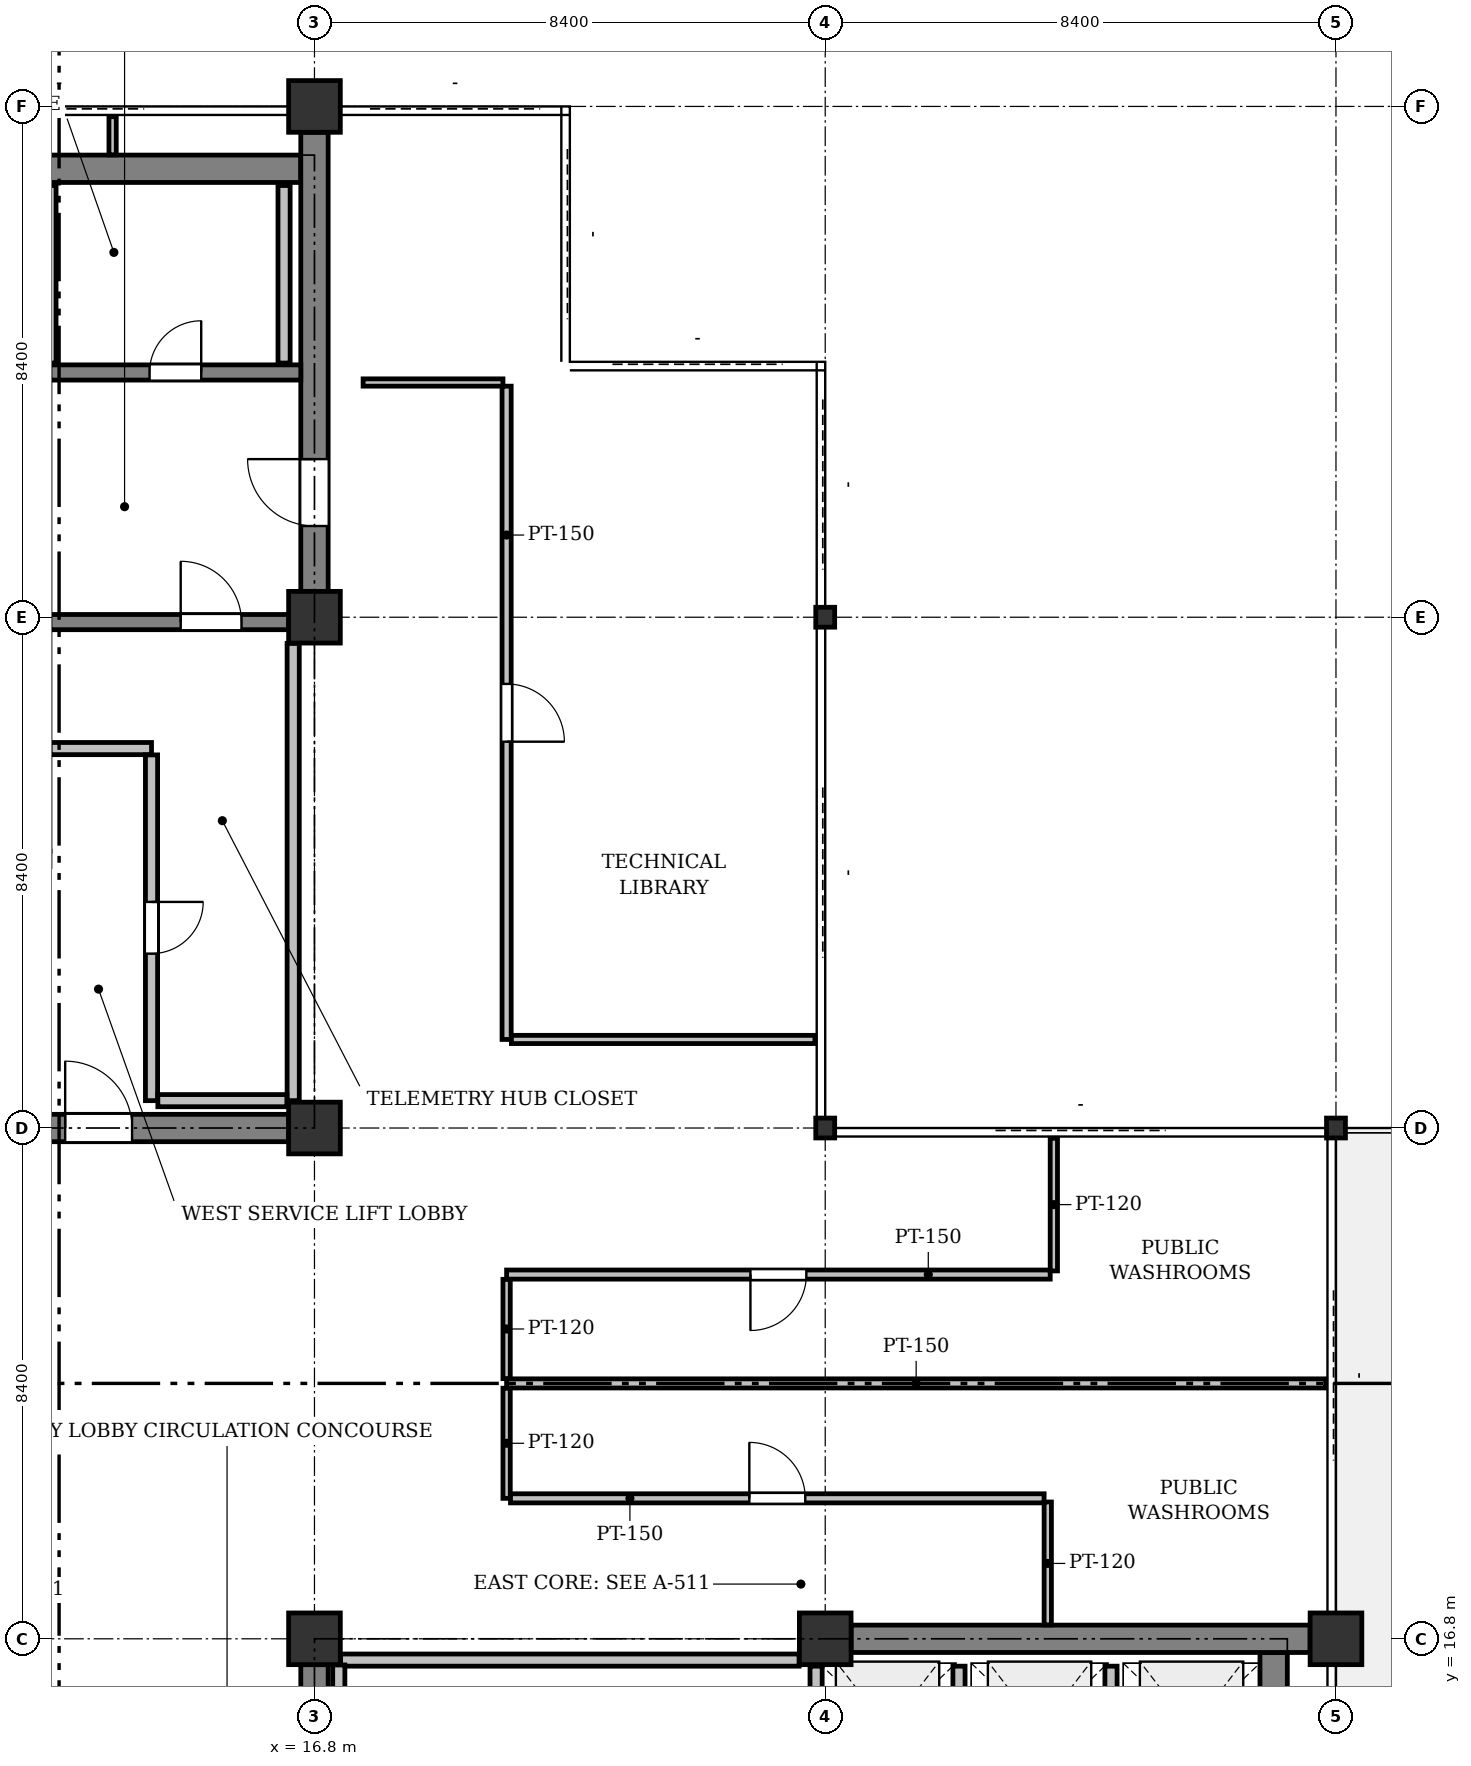
"""IFC4 building model, lengths in metres.
Left out: names, types, materials, properties, quantities, classifications, styles, units other than length and angle.
Written with IfcOpenShell. Run it as: python <this file> out.ifc"""

import sys

from ifc_helpers import new_model, si_unit, direction, frame, frame_2d, origin, origin_2d, place, context, subcontext, project, spatial, rectangle, i_section, extrude, element, fill, save


model = new_model("IFC4")
c1 = context("Model", 3, precision=1e-05, world=origin(), true_north=direction((0.0, 1.0)))
c2 = subcontext(c1, "Body", "Model", "MODEL_VIEW")
j1 = project(units=[si_unit("LENGTHUNIT", "METRE"), si_unit("PLANEANGLEUNIT", "RADIAN")], contexts=[c1])
p1 = place(None, origin())
s1 = spatial("IfcSite", under=j1, at=p1, CompositionType="ELEMENT")
p2 = place(p1, origin())
s2 = spatial("IfcBuilding", under=s1, at=p2, CompositionType="ELEMENT")
p3 = place(p2, frame((0.0, 0.0, 286.2)))
s3 = spatial("IfcBuildingStorey", under=s2, at=p3, CompositionType="ELEMENT", Elevation=286.2)
for number, where, z_axis, x_axis in (
    (1, (16.8, 16.8, 0.0), (0.0, 0.0, 1.0), (1.0, 0.0, 0.0)),
    (2, (16.8, 25.2, 0.0), (0.0, 0.0, 1.0), (1.0, 0.0, 0.0)),
    (3, (16.8, 33.6, 0.0), (0.0, 0.0, 1.0), (1.0, 0.0, 0.0)),
    (4, (16.8, 42.0, 0.0), (0.0, 0.0, 1.0), (1.0, 0.0, 0.0)),
    (5, (25.2, 16.8, 0.0), (0.0, 0.0, 1.0), (1.0, 0.0, 0.0)),
):
    element("IfcColumn", number, at=place(p3, frame(where, z_axis=z_axis, x_axis=x_axis)), inside=s3, PredefinedType="COLUMN", context=c2, shape_type="SweptSolid", body=[
        extrude(rectangle(XDim=0.85, YDim=0.85, at=origin_2d()), origin(), (0.0, 0.0, 1.0), 4.0),
    ])
for number, where, z_axis, x_axis in (
    (6, (25.2, 25.2, 0.0), (0.0, 0.0, 1.0), (1.0, 0.0, 0.0)),
    (7, (25.2, 33.6, 0.0), (0.0, 0.0, 1.0), (1.0, 0.0, 0.0)),
):
    element("IfcColumn", number, at=place(p3, frame(where, z_axis=z_axis, x_axis=x_axis)), inside=s3, PredefinedType="COLUMN", context=c2, shape_type="SweptSolid", body=[
        extrude(i_section(OverallWidth=0.311, OverallDepth=0.327, WebThickness=0.016, FlangeThickness=0.025, FilletRadius=0.017, at=origin_2d()), origin(), (0.0, 0.0, 1.0), 4.0),
    ])
p4 = place(p3, frame((33.6, 16.8, 0.0), z_axis=(0.0, 0.0, 1.0), x_axis=(1.0, 0.0, 0.0)))
e8 = element("IfcColumn", 8, at=p4, inside=s3, PredefinedType="COLUMN", context=c2, shape_type="SweptSolid", body=[
    extrude(rectangle(XDim=0.85, YDim=0.85, at=origin_2d()), origin(), (0.0, 0.0, 1.0), 4.0),
])
p5 = place(p3, frame((33.6, 25.2, 0.0), z_axis=(0.0, 0.0, 1.0), x_axis=(1.0, 0.0, 0.0)))
e9 = element("IfcColumn", 9, at=p5, inside=s3, PredefinedType="COLUMN", context=c2, shape_type="SweptSolid", body=[
    extrude(i_section(OverallWidth=0.311, OverallDepth=0.327, WebThickness=0.016, FlangeThickness=0.025, FilletRadius=0.017, at=origin_2d()), origin(), (0.0, 0.0, 1.0), 4.0),
])
p6 = place(p3, frame((8.625, 40.975, 0.0), z_axis=(0.0, 0.0, 1.0), x_axis=(1.0, 0.0, 0.0)))
e10 = element("IfcWall", 10, at=p6, inside=s3, PredefinedType="SHEAR", context=c2, shape_type="SweptSolid", body=[
    extrude(rectangle(XDim=7.95, YDim=0.45, at=frame_2d((3.975, 0.0))), origin(), (0.0, 0.0, 1.0), 3.725),
])
p7 = place(p3, frame((16.8, 34.025, 0.0), z_axis=(0.0, 0.0, 1.0), x_axis=(0.0, 1.0, 0.0)))
e11 = element("IfcWall", 11, at=p7, inside=s3, PredefinedType="SHEAR", context=c2, shape_type="SweptSolid", body=[
    extrude(rectangle(XDim=7.55, YDim=0.45, at=frame_2d((3.775, 0.0))), origin(), (0.0, 0.0, 1.0), 3.725),
])
p8 = place(p7, frame((1.075, 0.0, 0.0)))
e12 = element("IfcOpeningElement", 12, at=p8, cuts=e11, PredefinedType="OPENING", context=c2, shape_type="SweptSolid", body=[
    extrude(rectangle(XDim=1.1, YDim=2.15, at=frame_2d((0.55, 1.075))), frame((0.0, 0.235, 0.0), z_axis=(0.0, -1.0, 0.0), x_axis=(1.0, 0.0, 0.0)), (0.0, 0.0, 1.0), 0.47),
])
p9 = place(p3, frame((8.825, 25.2, 0.0), z_axis=(0.0, 0.0, 1.0), x_axis=(1.0, 0.0, 0.0)))
e13 = element("IfcWall", 13, at=p9, inside=s3, PredefinedType="SHEAR", context=c2, shape_type="SweptSolid", body=[
    extrude(rectangle(XDim=7.55, YDim=0.45, at=frame_2d((3.775, 0.0))), origin(), (0.0, 0.0, 1.0), 3.725),
])
p10 = place(p9, frame((3.875, 0.0, 0.0)))
e14 = element("IfcOpeningElement", 14, at=p10, cuts=e13, PredefinedType="OPENING", context=c2, shape_type="SweptSolid", body=[
    extrude(rectangle(XDim=1.1, YDim=2.15, at=frame_2d((0.55, 1.075))), frame((0.0, 0.235, 0.0), z_axis=(0.0, -1.0, 0.0), x_axis=(1.0, 0.0, 0.0)), (0.0, 0.0, 1.0), 0.47),
])
p11 = place(p3, frame((32.575, 8.625, 0.0), z_axis=(0.0, 0.0, 1.0), x_axis=(0.0, 1.0, 0.0)))
e15 = element("IfcWall", 15, at=p11, inside=s3, PredefinedType="SHEAR", context=c2, shape_type="SweptSolid", body=[
    extrude(rectangle(XDim=7.95, YDim=0.45, at=frame_2d((3.975, 0.0))), origin(), (0.0, 0.0, 1.0), 3.725),
])
p12 = place(p3, frame((16.8, 8.825, 0.0), z_axis=(0.0, 0.0, 1.0), x_axis=(0.0, 1.0, 0.0)))
e16 = element("IfcWall", 16, at=p12, inside=s3, PredefinedType="SHEAR", context=c2, shape_type="SweptSolid", body=[
    extrude(rectangle(XDim=7.55, YDim=0.45, at=frame_2d((3.775, 0.0))), origin(), (0.0, 0.0, 1.0), 3.725),
])
p13 = place(p12, frame((3.425, 0.0, 0.0)))
e17 = element("IfcOpeningElement", 17, at=p13, cuts=e16, PredefinedType="OPENING", context=c2, shape_type="SweptSolid", body=[
    extrude(rectangle(XDim=1.1, YDim=2.15, at=frame_2d((0.55, 1.075))), frame((0.0, 0.235, 0.0), z_axis=(0.0, -1.0, 0.0), x_axis=(1.0, 0.0, 0.0)), (0.0, 0.0, 1.0), 0.47),
])
p14 = place(p3, frame((25.625, 16.8, 0.0), z_axis=(0.0, 0.0, 1.0), x_axis=(1.0, 0.0, 0.0)))
e18 = element("IfcWall", 18, at=p14, inside=s3, PredefinedType="SHEAR", context=c2, shape_type="SweptSolid", body=[
    extrude(rectangle(XDim=7.55, YDim=0.45, at=frame_2d((3.775, 0.0))), origin(), (0.0, 0.0, 1.0), 3.725),
])
p15 = place(p3, frame((12.45, 33.52, 0.0), z_axis=(0.0, 0.0, 1.0), x_axis=(1.0, 0.0, 0.0)))
e19 = element("IfcWall", 19, at=p15, inside=s3, PredefinedType="SHEAR", context=c2, shape_type="SweptSolid", body=[
    extrude(rectangle(XDim=3.925, YDim=0.25, at=frame_2d((1.962, 0.0))), origin(), (0.0, 0.0, 1.0), 3.725),
])
p16 = place(p15, frame((2.15, 0.0, 0.0)))
e20 = element("IfcOpeningElement", 20, at=p16, cuts=e19, PredefinedType="OPENING", context=c2, shape_type="SweptSolid", body=[
    extrude(rectangle(XDim=1.0, YDim=2.15, at=frame_2d((0.5, 1.075))), frame((0.0, 0.135, 0.0), z_axis=(0.0, -1.0, 0.0), x_axis=(1.0, 0.0, 0.0)), (0.0, 0.0, 1.0), 0.27),
])
p17 = place(p3, frame((12.45, 37.625, 0.0), z_axis=(0.0, 0.0, 1.0), x_axis=(1.0, 0.0, 0.0)))
e21 = element("IfcWall", 21, at=p17, inside=s3, PredefinedType="SHEAR", context=c2, shape_type="SweptSolid", body=[
    extrude(rectangle(XDim=4.125, YDim=0.25, at=frame_2d((2.062, 0.0))), origin(), (0.0, 0.0, 1.0), 3.725),
])
p18 = place(p17, frame((1.637, 0.0, 0.0)))
e22 = element("IfcOpeningElement", 22, at=p18, cuts=e21, PredefinedType="OPENING", context=c2, shape_type="SweptSolid", body=[
    extrude(rectangle(XDim=0.85, YDim=2.15, at=frame_2d((0.425, 1.075))), frame((0.0, 0.135, 0.0), z_axis=(0.0, -1.0, 0.0), x_axis=(1.0, 0.0, 0.0)), (0.0, 0.0, 1.0), 0.27),
])
for number, where, z_axis, x_axis in (
    (23, (27.4, 14.3, 0.0), (0.0, 0.0, 1.0), (0.0, 1.0, 0.0)),
    (24, (25.05, 14.3, 0.0), (0.0, 0.0, 1.0), (0.0, 1.0, 0.0)),
    (25, (29.9, 14.3, 0.0), (0.0, 0.0, 1.0), (0.0, 1.0, 0.0)),
):
    element("IfcWall", number, at=place(p3, frame(where, z_axis=z_axis, x_axis=x_axis)), inside=s3, PredefinedType="PARTITIONING", context=c2, shape_type="SweptSolid", body=[
        extrude(rectangle(XDim=2.05, YDim=0.2, at=frame_2d((1.025, 0.0))), origin(), (0.0, 0.0, 1.0), 3.725),
    ])
p19 = place(p3, frame((16.45, 25.65, 0.0), z_axis=(0.0, 0.0, 1.0), x_axis=(0.0, 1.0, 0.0)))
e26 = element("IfcWall", 26, at=p19, inside=s3, PredefinedType="PARTITIONING", context=c2, shape_type="SweptSolid", body=[
    extrude(rectangle(XDim=7.52, YDim=0.2, at=frame_2d((3.76, 0.0))), origin(), (0.0, 0.0, 1.0), 3.725),
])
p20 = place(p3, frame((12.454, 31.44, 0.0), z_axis=(0.0, 0.0, 1.0), x_axis=(1.0, 0.0, 0.0)))
e27 = element("IfcWall", 27, at=p20, inside=s3, PredefinedType="PARTITIONING", context=c2, shape_type="SweptSolid", body=[
    extrude(rectangle(XDim=1.666, YDim=0.2, at=frame_2d((0.833, 0.0))), origin(), (0.0, 0.0, 1.0), 3.725),
])
p21 = place(p3, frame((14.12, 31.336, 0.0), z_axis=(0.0, 0.0, 1.0), x_axis=(0.0, -1.0, 0.0)))
e28 = element("IfcWall", 28, at=p21, inside=s3, PredefinedType="PARTITIONING", context=c2, shape_type="SweptSolid", body=[
    extrude(rectangle(XDim=5.686, YDim=0.2, at=frame_2d((2.843, 0.0))), origin(), (0.0, 0.0, 1.0), 3.725),
])
p22 = place(p21, frame((2.418, 0.0, 0.0)))
e29 = element("IfcOpeningElement", 29, at=p22, cuts=e28, PredefinedType="OPENING", context=c2, shape_type="SweptSolid", body=[
    extrude(rectangle(XDim=0.85, YDim=2.15, at=frame_2d((0.425, 1.075))), frame((0.0, 0.11, 0.0), z_axis=(0.0, -1.0, 0.0), x_axis=(1.0, 0.0, 0.0)), (0.0, 0.0, 1.0), 0.22),
])
p23 = place(p3, frame((14.224, 25.65, 0.0), z_axis=(0.0, 0.0, 1.0), x_axis=(1.0, 0.0, 0.0)))
e30 = element("IfcWall", 30, at=p23, inside=s3, PredefinedType="PARTITIONING", context=c2, shape_type="SweptSolid", body=[
    extrude(rectangle(XDim=2.122, YDim=0.2, at=frame_2d((1.061, 0.0))), origin(), (0.0, 0.0, 1.0), 3.725),
])
for number, where, z_axis, x_axis in (
    (31, (16.3, 37.78, 0.0), (0.0, 0.0, 1.0), (0.0, 1.0, 0.0)),
    (32, (12.45, 40.7, 0.0), (0.0, 0.0, 1.0), (0.0, -1.0, 0.0)),
):
    element("IfcWall", number, at=place(p3, frame(where, z_axis=z_axis, x_axis=x_axis)), inside=s3, PredefinedType="PARTITIONING", context=c2, shape_type="SweptSolid", body=[
        extrude(rectangle(XDim=2.92, YDim=0.2, at=frame_2d((1.46, 0.0))), origin(), (0.0, 0.0, 1.0), 2.775),
    ])
p24 = place(p3, frame((24.77, 16.45, 0.0), z_axis=(0.0, 0.0, 1.0), x_axis=(-1.0, 0.0, 0.0)))
e33 = element("IfcWall", 33, at=p24, inside=s3, PredefinedType="PARTITIONING", context=c2, shape_type="SweptSolid", body=[
    extrude(rectangle(XDim=7.54, YDim=0.2, at=frame_2d((3.77, 0.0))), origin(), (0.0, 0.0, 1.0), 3.725),
])
p25 = place(p3, frame((17.2, 16.37, 0.0), z_axis=(0.0, 0.0, 1.0), x_axis=(0.0, -1.0, 0.0)))
e34 = element("IfcWall", 34, at=p25, inside=s3, PredefinedType="PARTITIONING", context=c2, shape_type="SweptSolid", body=[
    extrude(rectangle(XDim=2.17, YDim=0.2, at=frame_2d((1.085, 0.0))), origin(), (0.0, 0.0, 1.0), 3.725),
])
p26 = place(p3, frame((33.431, 21.0, 0.0), z_axis=(0.0, 0.0, 1.0), x_axis=(-1.0, 0.0, 0.0)))
e35 = element("IfcWall", 35, at=p26, inside=s3, PredefinedType="PARTITIONING", context=c2, shape_type="SweptSolid", body=[
    extrude(rectangle(XDim=13.471, YDim=0.15, at=frame_2d((6.735, 0.0))), origin(), (0.0, 0.0, 1.0), 3.319),
])
p27 = place(p3, frame((19.96, 20.921, 0.0), z_axis=(0.0, 0.0, 1.0), x_axis=(0.0, -1.0, 0.0)))
e36 = element("IfcWall", 36, at=p27, inside=s3, PredefinedType="PARTITIONING", context=c2, shape_type="SweptSolid", body=[
    extrude(rectangle(XDim=1.811, YDim=0.12, at=frame_2d((0.905, 0.0))), origin(), (0.0, 0.0, 1.0), 3.725),
])
p28 = place(p3, frame((20.024, 19.11, 0.0), z_axis=(0.0, 0.0, 1.0), x_axis=(1.0, 0.0, 0.0)))
e37 = element("IfcWall", 37, at=p28, inside=s3, PredefinedType="PARTITIONING", context=c2, shape_type="SweptSolid", body=[
    extrude(rectangle(XDim=8.776, YDim=0.15, at=frame_2d((4.388, 0.0))), origin(), (0.0, 0.0, 1.0), 3.319),
])
p29 = place(p28, frame((3.928, 0.0, 0.0)))
e38 = element("IfcOpeningElement", 38, at=p29, cuts=e37, PredefinedType="OPENING", context=c2, shape_type="SweptSolid", body=[
    extrude(rectangle(XDim=0.92, YDim=2.1, at=frame_2d((0.46, 1.05))), frame((0.0, 0.085, 0.0), z_axis=(0.0, -1.0, 0.0), x_axis=(1.0, 0.0, 0.0)), (0.0, 0.0, 1.0), 0.17),
])
p30 = place(p3, frame((28.86, 19.05, 0.0), z_axis=(0.0, 0.0, 1.0), x_axis=(0.0, -1.0, 0.0)))
e39 = element("IfcWall", 39, at=p30, inside=s3, PredefinedType="PARTITIONING", context=c2, shape_type="SweptSolid", body=[
    extrude(rectangle(XDim=2.021, YDim=0.12, at=frame_2d((1.01, 0.0))), origin(), (0.0, 0.0, 1.0), 3.725),
])
p31 = place(p3, frame((28.9, 22.79, 0.0), z_axis=(0.0, 0.0, 1.0), x_axis=(-1.0, 0.0, 0.0)))
e40 = element("IfcWall", 40, at=p31, inside=s3, PredefinedType="PARTITIONING", context=c2, shape_type="SweptSolid", body=[
    extrude(rectangle(XDim=8.94, YDim=0.15, at=frame_2d((4.47, 0.0))), origin(), (0.0, 0.0, 1.0), 3.319),
])
p32 = place(p31, frame((4.01, 0.0, 0.0)))
e41 = element("IfcOpeningElement", 41, at=p32, cuts=e40, PredefinedType="OPENING", context=c2, shape_type="SweptSolid", body=[
    extrude(rectangle(XDim=0.92, YDim=2.1, at=frame_2d((0.46, 1.05))), frame((0.0, 0.085, 0.0), z_axis=(0.0, -1.0, 0.0), x_axis=(1.0, 0.0, 0.0)), (0.0, 0.0, 1.0), 0.17),
])
p33 = place(p3, frame((19.96, 22.711, 0.0), z_axis=(0.0, 0.0, 1.0), x_axis=(0.0, -1.0, 0.0)))
e42 = element("IfcWall", 42, at=p33, inside=s3, PredefinedType="PARTITIONING", context=c2, shape_type="SweptSolid", body=[
    extrude(rectangle(XDim=1.632, YDim=0.12, at=frame_2d((0.816, 0.0))), origin(), (0.0, 0.0, 1.0), 3.725),
])
p34 = place(p3, frame((28.96, 25.031, 0.0), z_axis=(0.0, 0.0, 1.0), x_axis=(0.0, -1.0, 0.0)))
e43 = element("IfcWall", 43, at=p34, inside=s3, PredefinedType="PARTITIONING", context=c2, shape_type="SweptSolid", body=[
    extrude(rectangle(XDim=2.181, YDim=0.12, at=frame_2d((1.09, 0.0))), origin(), (0.0, 0.0, 1.0), 3.725),
])
p35 = place(p3, frame((19.96, 37.4, 0.0), z_axis=(0.0, 0.0, 1.0), x_axis=(0.0, -1.0, 0.0)))
e44 = element("IfcWall", 44, at=p35, inside=s3, PredefinedType="PARTITIONING", context=c2, shape_type="SweptSolid", body=[
    extrude(rectangle(XDim=10.743, YDim=0.15, at=frame_2d((5.372, 0.0))), origin(), (0.0, 0.0, 1.0), 3.271),
])
p36 = place(p35, frame((4.897, 0.0, 0.0)))
e45 = element("IfcOpeningElement", 45, at=p36, cuts=e44, PredefinedType="OPENING", context=c2, shape_type="SweptSolid", body=[
    extrude(rectangle(XDim=0.95, YDim=2.15, at=frame_2d((0.475, 1.075))), frame((0.0, 0.085, 0.0), z_axis=(0.0, -1.0, 0.0), x_axis=(1.0, 0.0, 0.0)), (0.0, 0.0, 1.0), 0.17),
])
p37 = place(p3, frame((20.039, 26.656, 0.0), z_axis=(0.0, 0.0, 1.0), x_axis=(1.0, 0.0, 0.0)))
e46 = element("IfcWall", 46, at=p37, inside=s3, PredefinedType="PARTITIONING", context=c2, shape_type="SweptSolid", body=[
    extrude(rectangle(XDim=4.992, YDim=0.135, at=frame_2d((2.496, 0.0))), origin(), (0.0, 0.0, 1.0), 3.421),
])
p38 = place(p3, frame((13.48, 41.831, 0.0), z_axis=(0.0, 0.0, 1.0), x_axis=(0.0, -1.0, 0.0)))
e47 = element("IfcWall", 47, at=p38, inside=s3, PredefinedType="PARTITIONING", context=c2, shape_type="SweptSolid", body=[
    extrude(rectangle(XDim=0.627, YDim=0.12, at=frame_2d((0.313, 0.0))), origin(), (0.0, 0.0, 1.0), 3.725),
])
p39 = place(p3, frame((17.6, 37.46, 0.0), z_axis=(0.0, 0.0, 1.0), x_axis=(1.0, 0.0, 0.0)))
e48 = element("IfcWall", 48, at=p39, inside=s3, PredefinedType="PARTITIONING", context=c2, shape_type="SweptSolid", body=[
    extrude(rectangle(XDim=2.3, YDim=0.12, at=frame_2d((1.15, 0.0))), origin(), (0.0, 0.0, 1.0), 3.725),
])
p40 = place(p8, origin())
e49 = element("IfcDoor", 49, at=p40, inside=s3, OperationType="SINGLE_SWING_RIGHT", PredefinedType="DOOR", context=c2, shape_type="SweptSolid", body=[
    extrude(rectangle(XDim=1.1, YDim=2.15, at=frame_2d((0.55, 1.075))), frame((0.0, 0.025, 0.0), z_axis=(0.0, -1.0, 0.0), x_axis=(1.0, 0.0, 0.0)), (0.0, 0.0, 1.0), 0.05),
])
fill(e12, e49)
p41 = place(p10, origin())
e50 = element("IfcDoor", 50, at=p41, inside=s3, OperationType="SINGLE_SWING_LEFT", PredefinedType="DOOR", context=c2, shape_type="SweptSolid", body=[
    extrude(rectangle(XDim=1.1, YDim=2.15, at=frame_2d((0.55, 1.075))), frame((0.0, 0.025, 0.0), z_axis=(0.0, -1.0, 0.0), x_axis=(1.0, 0.0, 0.0)), (0.0, 0.0, 1.0), 0.05),
])
fill(e14, e50)
p42 = place(p16, origin())
e51 = element("IfcDoor", 51, at=p42, inside=s3, OperationType="SINGLE_SWING_LEFT", PredefinedType="DOOR", context=c2, shape_type="SweptSolid", body=[
    extrude(rectangle(XDim=1.0, YDim=2.15, at=frame_2d((0.5, 1.075))), frame((0.0, 0.025, 0.0), z_axis=(0.0, -1.0, 0.0), x_axis=(1.0, 0.0, 0.0)), (0.0, 0.0, 1.0), 0.05),
])
fill(e20, e51)
p43 = place(p22, origin())
e52 = element("IfcDoor", 52, at=p43, inside=s3, OperationType="SINGLE_SWING_LEFT", PredefinedType="DOOR", context=c2, shape_type="SweptSolid", body=[
    extrude(rectangle(XDim=0.85, YDim=2.15, at=frame_2d((0.425, 1.075))), frame((0.0, 0.025, 0.0), z_axis=(0.0, -1.0, 0.0), x_axis=(1.0, 0.0, 0.0)), (0.0, 0.0, 1.0), 0.05),
])
fill(e29, e52)
p44 = place(p18, origin())
e53 = element("IfcDoor", 53, at=p44, inside=s3, OperationType="SINGLE_SWING_RIGHT", PredefinedType="DOOR", context=c2, shape_type="SweptSolid", body=[
    extrude(rectangle(XDim=0.85, YDim=2.15, at=frame_2d((0.425, 1.075))), frame((0.0, 0.025, 0.0), z_axis=(0.0, -1.0, 0.0), x_axis=(1.0, 0.0, 0.0)), (0.0, 0.0, 1.0), 0.05),
])
fill(e22, e53)
p45 = place(p29, origin())
e54 = element("IfcDoor", 54, at=p45, inside=s3, OperationType="SINGLE_SWING_LEFT", PredefinedType="DOOR", context=c2, shape_type="SweptSolid", body=[
    extrude(rectangle(XDim=0.92, YDim=2.1, at=frame_2d((0.46, 1.05))), frame((0.0, 0.025, 0.0), z_axis=(0.0, -1.0, 0.0), x_axis=(1.0, 0.0, 0.0)), (0.0, 0.0, 1.0), 0.05),
])
fill(e38, e54)
p46 = place(p32, origin())
e55 = element("IfcDoor", 55, at=p46, inside=s3, OperationType="SINGLE_SWING_RIGHT", PredefinedType="DOOR", context=c2, shape_type="SweptSolid", body=[
    extrude(rectangle(XDim=0.92, YDim=2.1, at=frame_2d((0.46, 1.05))), frame((0.0, 0.025, 0.0), z_axis=(0.0, -1.0, 0.0), x_axis=(1.0, 0.0, 0.0)), (0.0, 0.0, 1.0), 0.05),
])
fill(e41, e55)
p47 = place(p36, origin())
e56 = element("IfcDoor", 56, at=p47, inside=s3, OperationType="SINGLE_SWING_RIGHT", PredefinedType="DOOR", context=c2, shape_type="SweptSolid", body=[
    extrude(rectangle(XDim=0.95, YDim=2.15, at=frame_2d((0.475, 1.075))), frame((0.0, 0.025, 0.0), z_axis=(0.0, -1.0, 0.0), x_axis=(1.0, 0.0, 0.0)), (0.0, 0.0, 1.0), 0.05),
])
fill(e45, e56)
save(model, sys.argv[1])
